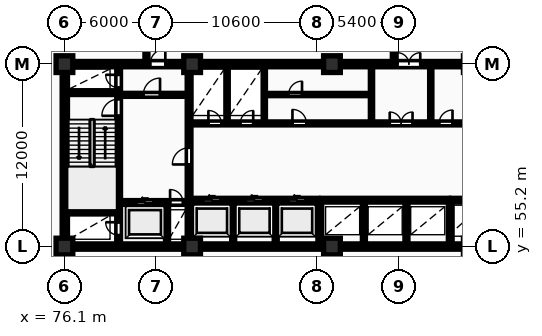
"""IFC4 building model, lengths in metres.
Left out: names, types, materials, properties, quantities, classifications, styles, units other than length and angle.
Written with IfcOpenShell. Run it as: python <this file> out.ifc"""

import sys

from ifc_helpers import new_model, si_unit, direction, frame, frame_2d, origin, origin_2d, place, context, subcontext, project, spatial, rectangle, extrude, element, fill, save


model = new_model("IFC4")
c1 = context("Model", 3, precision=1e-05, world=origin(), true_north=direction((0.0, 1.0)))
c2 = subcontext(c1, "Body", "Model", "MODEL_VIEW")
j1 = project(units=[si_unit("LENGTHUNIT", "METRE"), si_unit("PLANEANGLEUNIT", "RADIAN")], contexts=[c1])
p1 = place(None, origin())
s1 = spatial("IfcSite", under=j1, at=p1, CompositionType="ELEMENT")
p2 = place(p1, origin())
s2 = spatial("IfcBuilding", under=s1, at=p2, CompositionType="ELEMENT")
p3 = place(p2, frame((0.0, 0.0, 10.0)))
s3 = spatial("IfcBuildingStorey", under=s2, at=p3, CompositionType="ELEMENT", Elevation=10.0)
for number, where, z_axis, x_axis in (
    (1, (76.1, 55.2, 0.0), (0.0, 0.0, 1.0), (1.0, 0.0, 0.0)),
    (2, (76.1, 67.2, 0.0), (0.0, 0.0, 1.0), (1.0, 0.0, 0.0)),
    (3, (84.5, 55.2, 0.0), (0.0, 0.0, 1.0), (1.0, 0.0, 0.0)),
    (4, (84.5, 67.2, 0.0), (0.0, 0.0, 1.0), (1.0, 0.0, 0.0)),
    (5, (93.7, 55.2, 0.0), (0.0, 0.0, 1.0), (1.0, 0.0, 0.0)),
    (6, (93.7, 67.2, 0.0), (0.0, 0.0, 1.0), (1.0, 0.0, 0.0)),
):
    element("IfcColumn", number, at=place(p3, frame(where, z_axis=z_axis, x_axis=x_axis)), inside=s3, PredefinedType="COLUMN", context=c2, shape_type="SweptSolid", body=[
        extrude(rectangle(XDim=1.1, YDim=1.1, at=origin_2d()), origin(), (0.0, 0.0, 1.0), 4.5),
    ])
p4 = place(p3, frame((75.95, 55.2, 0.0), z_axis=(0.0, 0.0, 1.0), x_axis=(1.0, 0.0, 0.0)))
e7 = element("IfcWall", 7, at=p4, inside=s3, PredefinedType="SHEAR", context=c2, shape_type="SweptSolid", body=[
    extrude(rectangle(XDim=36.3, YDim=0.35, at=frame_2d((18.15, 0.0))), origin(), (0.0, 0.0, 1.0), 4.5),
])
p5 = place(p3, frame((76.125, 55.375, 0.0), z_axis=(0.0, 0.0, 1.0), x_axis=(0.0, 1.0, 0.0)))
e8 = element("IfcWall", 8, at=p5, inside=s3, PredefinedType="SHEAR", context=c2, shape_type="SweptSolid", body=[
    extrude(rectangle(XDim=11.65, YDim=0.35, at=frame_2d((5.825, 0.0))), origin(), (0.0, 0.0, 1.0), 4.5),
])
p6 = place(p3, frame((75.95, 67.2, 0.0), z_axis=(0.0, 0.0, 1.0), x_axis=(1.0, 0.0, 0.0)))
e9 = element("IfcWall", 9, at=p6, inside=s3, PredefinedType="SHEAR", context=c2, shape_type="SweptSolid", body=[
    extrude(rectangle(XDim=36.3, YDim=0.35, at=frame_2d((18.15, 0.0))), origin(), (0.0, 0.0, 1.0), 4.5),
])
p7 = place(p6, frame((5.788, 0.0, 0.0)))
e10 = element("IfcOpeningElement", 10, at=p7, cuts=e9, PredefinedType="OPENING", context=c2, shape_type="SweptSolid", body=[
    extrude(rectangle(XDim=1.0, YDim=2.15, at=frame_2d((0.5, 1.075))), frame((0.0, 0.185, 0.0), z_axis=(0.0, -1.0, 0.0), x_axis=(1.0, 0.0, 0.0)), (0.0, 0.0, 1.0), 0.37),
])
p8 = place(p6, frame((22.058, 0.0, 0.0)))
e11 = element("IfcOpeningElement", 11, at=p8, cuts=e9, PredefinedType="OPENING", context=c2, shape_type="SweptSolid", body=[
    extrude(rectangle(XDim=1.5, YDim=2.2, at=frame_2d((0.75, 1.1))), frame((0.0, 0.185, 0.0), z_axis=(0.0, -1.0, 0.0), x_axis=(1.0, 0.0, 0.0)), (0.0, 0.0, 1.0), 0.37),
])
p9 = place(p6, frame((30.45, 0.0, 0.0)))
e12 = element("IfcOpeningElement", 12, at=p9, cuts=e9, PredefinedType="OPENING", context=c2, shape_type="SweptSolid", body=[
    extrude(rectangle(XDim=1.0, YDim=2.15, at=frame_2d((0.5, 1.075))), frame((0.0, 0.185, 0.0), z_axis=(0.0, -1.0, 0.0), x_axis=(1.0, 0.0, 0.0)), (0.0, 0.0, 1.0), 0.37),
])
p10 = place(p3, frame((79.665, 55.4, 0.0), z_axis=(0.0, 0.0, 1.0), x_axis=(0.0, 1.0, 0.0)))
e13 = element("IfcWall", 13, at=p10, inside=s3, PredefinedType="SHEAR", context=c2, shape_type="SweptSolid", body=[
    extrude(rectangle(XDim=11.6, YDim=0.25, at=frame_2d((5.8, 0.0))), origin(), (0.0, 0.0, 1.0), 4.5),
])
p11 = place(p10, frame((0.55, 0.0, 0.0)))
e14 = element("IfcOpeningElement", 14, at=p11, cuts=e13, PredefinedType="OPENING", context=c2, shape_type="SweptSolid", body=[
    extrude(rectangle(XDim=0.85, YDim=2.05, at=frame_2d((0.425, 1.025))), frame((0.0, 0.135, 0.0), z_axis=(0.0, -1.0, 0.0), x_axis=(1.0, 0.0, 0.0)), (0.0, 0.0, 1.0), 0.27),
])
p12 = place(p10, frame((8.4, 0.0, 0.0)))
e15 = element("IfcOpeningElement", 15, at=p12, cuts=e13, PredefinedType="OPENING", context=c2, shape_type="SweptSolid", body=[
    extrude(rectangle(XDim=1.1, YDim=2.1, at=frame_2d((0.55, 1.05))), frame((0.0, 0.135, 0.0), z_axis=(0.0, -1.0, 0.0), x_axis=(1.0, 0.0, 0.0)), (0.0, 0.0, 1.0), 0.27),
])
p13 = place(p10, frame((10.25, 0.0, 0.0)))
e16 = element("IfcOpeningElement", 16, at=p13, cuts=e13, PredefinedType="OPENING", context=c2, shape_type="SweptSolid", body=[
    extrude(rectangle(XDim=0.85, YDim=2.05, at=frame_2d((0.425, 1.025))), frame((0.0, 0.135, 0.0), z_axis=(0.0, -1.0, 0.0), x_axis=(1.0, 0.0, 0.0)), (0.0, 0.0, 1.0), 0.27),
])
for number, where, z_axis, x_axis in (
    (17, (76.3, 57.475, 0.0), (0.0, 0.0, 1.0), (1.0, 0.0, 0.0)),
    (18, (76.3, 65.325, 0.0), (0.0, 0.0, 1.0), (1.0, 0.0, 0.0)),
):
    element("IfcWall", number, at=place(p3, frame(where, z_axis=z_axis, x_axis=x_axis)), inside=s3, PredefinedType="SHEAR", context=c2, shape_type="SweptSolid", body=[
        extrude(rectangle(XDim=3.24, YDim=0.25, at=frame_2d((1.62, 0.0))), origin(), (0.0, 0.0, 1.0), 4.5),
    ])
p14 = place(p3, frame((79.79, 58.1, 0.0), z_axis=(0.0, 0.0, 1.0), x_axis=(1.0, 0.0, 0.0)))
e19 = element("IfcWall", 19, at=p14, inside=s3, PredefinedType="SHEAR", context=c2, shape_type="SweptSolid", body=[
    extrude(rectangle(XDim=4.39, YDim=0.25, at=frame_2d((2.195, 0.0))), origin(), (0.0, 0.0, 1.0), 4.5),
])
p15 = place(p14, frame((1.05, 0.0, 0.0)))
e20 = element("IfcOpeningElement", 20, at=p15, cuts=e19, PredefinedType="OPENING", context=c2, shape_type="SweptSolid", body=[
    extrude(rectangle(XDim=1.12, YDim=2.12, at=frame_2d((0.56, 1.06))), frame((0.0, 0.135, 0.0), z_axis=(0.0, -1.0, 0.0), x_axis=(1.0, 0.0, 0.0)), (0.0, 0.0, 1.0), 0.27),
])
p16 = place(p14, frame((3.26, 0.0, 0.0)))
e21 = element("IfcOpeningElement", 21, at=p16, cuts=e19, PredefinedType="OPENING", context=c2, shape_type="SweptSolid", body=[
    extrude(rectangle(XDim=0.85, YDim=2.05, at=frame_2d((0.425, 1.025))), frame((0.0, 0.135, 0.0), z_axis=(0.0, -1.0, 0.0), x_axis=(1.0, 0.0, 0.0)), (0.0, 0.0, 1.0), 0.27),
])
p17 = place(p3, frame((82.85, 55.4, 0.0), z_axis=(0.0, 0.0, 1.0), x_axis=(0.0, 1.0, 0.0)))
e22 = element("IfcWall", 22, at=p17, inside=s3, PredefinedType="PARTITIONING", context=c2, shape_type="SweptSolid", body=[
    extrude(rectangle(XDim=2.56, YDim=0.2, at=frame_2d((1.28, 0.0))), origin(), (0.0, 0.0, 1.0), 4.2),
])
p18 = place(p3, frame((79.79, 65.18, 0.0), z_axis=(0.0, 0.0, 1.0), x_axis=(1.0, 0.0, 0.0)))
e23 = element("IfcWall", 23, at=p18, inside=s3, PredefinedType="PARTITIONING", context=c2, shape_type="SweptSolid", body=[
    extrude(rectangle(XDim=4.39, YDim=0.2, at=frame_2d((2.195, 0.0))), origin(), (0.0, 0.0, 1.0), 4.2),
])
p19 = place(p18, frame((1.5, 0.0, 0.0)))
e24 = element("IfcOpeningElement", 24, at=p19, cuts=e23, PredefinedType="OPENING", context=c2, shape_type="SweptSolid", body=[
    extrude(rectangle(XDim=1.1, YDim=2.1, at=frame_2d((0.55, 1.05))), frame((0.0, 0.11, 0.0), z_axis=(0.0, -1.0, 0.0), x_axis=(1.0, 0.0, 0.0)), (0.0, 0.0, 1.0), 0.22),
])
p20 = place(p3, frame((84.3, 55.4, 0.0), z_axis=(0.0, 0.0, 1.0), x_axis=(0.0, 1.0, 0.0)))
e25 = element("IfcWall", 25, at=p20, inside=s3, PredefinedType="SHEAR", context=c2, shape_type="SweptSolid", body=[
    extrude(rectangle(XDim=11.6, YDim=0.25, at=frame_2d((5.8, 0.0))), origin(), (0.0, 0.0, 1.0), 4.5),
])
p21 = place(p20, frame((5.2, 0.0, 0.0)))
e26 = element("IfcOpeningElement", 26, at=p21, cuts=e25, PredefinedType="OPENING", context=c2, shape_type="SweptSolid", body=[
    extrude(rectangle(XDim=1.1, YDim=2.1, at=frame_2d((0.55, 1.05))), frame((0.0, 0.135, 0.0), z_axis=(0.0, -1.0, 0.0), x_axis=(1.0, 0.0, 0.0)), (0.0, 0.0, 1.0), 0.27),
])
for number, where, z_axis, x_axis in (
    (27, (87.2, 55.4, 0.0), (0.0, 0.0, 1.0), (0.0, 1.0, 0.0)),
    (28, (90.0, 55.4, 0.0), (0.0, 0.0, 1.0), (0.0, 1.0, 0.0)),
):
    element("IfcWall", number, at=place(p3, frame(where, z_axis=z_axis, x_axis=x_axis)), inside=s3, PredefinedType="PARTITIONING", context=c2, shape_type="SweptSolid", body=[
        extrude(rectangle(XDim=2.72, YDim=0.2, at=frame_2d((1.36, 0.0))), origin(), (0.0, 0.0, 1.0), 4.2),
    ])
p22 = place(p3, frame((84.42, 58.25, 0.0), z_axis=(0.0, 0.0, 1.0), x_axis=(1.0, 0.0, 0.0)))
e29 = element("IfcWall", 29, at=p22, inside=s3, PredefinedType="SHEAR", context=c2, shape_type="SweptSolid", body=[
    extrude(rectangle(XDim=8.36, YDim=0.25, at=frame_2d((4.18, 0.0))), origin(), (0.0, 0.0, 1.0), 4.5),
])
p23 = place(p22, frame((0.82, 0.0, 0.0)))
e30 = element("IfcOpeningElement", 30, at=p23, cuts=e29, PredefinedType="OPENING", context=c2, shape_type="SweptSolid", body=[
    extrude(rectangle(XDim=1.12, YDim=2.12, at=frame_2d((0.56, 1.06))), frame((0.0, 0.135, 0.0), z_axis=(0.0, -1.0, 0.0), x_axis=(1.0, 0.0, 0.0)), (0.0, 0.0, 1.0), 0.27),
])
p24 = place(p22, frame((3.62, 0.0, 0.0)))
e31 = element("IfcOpeningElement", 31, at=p24, cuts=e29, PredefinedType="OPENING", context=c2, shape_type="SweptSolid", body=[
    extrude(rectangle(XDim=1.12, YDim=2.12, at=frame_2d((0.56, 1.06))), frame((0.0, 0.135, 0.0), z_axis=(0.0, -1.0, 0.0), x_axis=(1.0, 0.0, 0.0)), (0.0, 0.0, 1.0), 0.27),
])
p25 = place(p22, frame((6.42, 0.0, 0.0)))
e32 = element("IfcOpeningElement", 32, at=p25, cuts=e29, PredefinedType="OPENING", context=c2, shape_type="SweptSolid", body=[
    extrude(rectangle(XDim=1.12, YDim=2.12, at=frame_2d((0.56, 1.06))), frame((0.0, 0.135, 0.0), z_axis=(0.0, -1.0, 0.0), x_axis=(1.0, 0.0, 0.0)), (0.0, 0.0, 1.0), 0.27),
])
p26 = place(p3, frame((92.9, 55.4, 0.0), z_axis=(0.0, 0.0, 1.0), x_axis=(0.0, 1.0, 0.0)))
e33 = element("IfcWall", 33, at=p26, inside=s3, PredefinedType="SHEAR", context=c2, shape_type="SweptSolid", body=[
    extrude(rectangle(XDim=2.85, YDim=0.25, at=frame_2d((1.425, 0.0))), origin(), (0.0, 0.0, 1.0), 4.5),
])
for number, where, z_axis, x_axis in (
    (34, (95.8, 55.4, 0.0), (0.0, 0.0, 1.0), (0.0, 1.0, 0.0)),
    (35, (98.6, 55.4, 0.0), (0.0, 0.0, 1.0), (0.0, 1.0, 0.0)),
):
    element("IfcWall", number, at=place(p3, frame(where, z_axis=z_axis, x_axis=x_axis)), inside=s3, PredefinedType="PARTITIONING", context=c2, shape_type="SweptSolid", body=[
        extrude(rectangle(XDim=2.72, YDim=0.2, at=frame_2d((1.36, 0.0))), origin(), (0.0, 0.0, 1.0), 4.2),
    ])
p27 = place(p3, frame((93.02, 58.25, 0.0), z_axis=(0.0, 0.0, 1.0), x_axis=(1.0, 0.0, 0.0)))
e36 = element("IfcWall", 36, at=p27, inside=s3, PredefinedType="SHEAR", context=c2, shape_type="SweptSolid", body=[
    extrude(rectangle(XDim=8.36, YDim=0.25, at=frame_2d((4.18, 0.0))), origin(), (0.0, 0.0, 1.0), 4.5),
])
p28 = place(p3, frame((101.48, 55.4, 0.0), z_axis=(0.0, 0.0, 1.0), x_axis=(0.0, 1.0, 0.0)))
e37 = element("IfcWall", 37, at=p28, inside=s3, PredefinedType="SHEAR", context=c2, shape_type="SweptSolid", body=[
    extrude(rectangle(XDim=2.85, YDim=0.25, at=frame_2d((1.425, 0.0))), origin(), (0.0, 0.0, 1.0), 4.5),
])
p29 = place(p3, frame((101.55, 58.25, 0.0), z_axis=(0.0, 0.0, 1.0), x_axis=(1.0, 0.0, 0.0)))
e38 = element("IfcWall", 38, at=p29, inside=s3, PredefinedType="SHEAR", context=c2, shape_type="SweptSolid", body=[
    extrude(rectangle(XDim=4.6, YDim=0.25, at=frame_2d((2.3, 0.0))), origin(), (0.0, 0.0, 1.0), 4.5),
])
for number, where, z_axis, x_axis in (
    (39, (86.8, 63.4, 0.0), (0.0, 0.0, 1.0), (0.0, 1.0, 0.0)),
    (40, (89.25, 63.4, 0.0), (0.0, 0.0, 1.0), (0.0, 1.0, 0.0)),
):
    element("IfcWall", number, at=place(p3, frame(where, z_axis=z_axis, x_axis=x_axis)), inside=s3, PredefinedType="PARTITIONING", context=c2, shape_type="SweptSolid", body=[
        extrude(rectangle(XDim=3.6, YDim=0.15, at=frame_2d((1.8, 0.0))), origin(), (0.0, 0.0, 1.0), 4.2),
    ])
p30 = place(p3, frame((89.25, 65.2, 0.0), z_axis=(0.0, 0.0, 1.0), x_axis=(1.0, 0.0, 0.0)))
e41 = element("IfcWall", 41, at=p30, inside=s3, PredefinedType="PARTITIONING", context=c2, shape_type="SweptSolid", body=[
    extrude(rectangle(XDim=7.05, YDim=0.15, at=frame_2d((3.525, 0.0))), origin(), (0.0, 0.0, 1.0), 4.2),
])
p31 = place(p30, frame((1.6, 0.0, 0.0)))
e42 = element("IfcOpeningElement", 42, at=p31, cuts=e41, PredefinedType="OPENING", context=c2, shape_type="SweptSolid", body=[
    extrude(rectangle(XDim=0.88, YDim=2.06, at=frame_2d((0.44, 1.03))), frame((0.0, 0.085, 0.0), z_axis=(0.0, -1.0, 0.0), x_axis=(1.0, 0.0, 0.0)), (0.0, 0.0, 1.0), 0.17),
])
for number, where, z_axis, x_axis in (
    (43, (96.3, 63.4, 0.0), (0.0, 0.0, 1.0), (0.0, 1.0, 0.0)),
    (44, (100.2, 63.4, 0.0), (0.0, 0.0, 1.0), (0.0, 1.0, 0.0)),
):
    element("IfcWall", number, at=place(p3, frame(where, z_axis=z_axis, x_axis=x_axis)), inside=s3, PredefinedType="PARTITIONING", context=c2, shape_type="SweptSolid", body=[
        extrude(rectangle(XDim=3.6, YDim=0.15, at=frame_2d((1.8, 0.0))), origin(), (0.0, 0.0, 1.0), 4.2),
    ])
p32 = place(p3, frame((84.42, 63.3, 0.0), z_axis=(0.0, 0.0, 1.0), x_axis=(1.0, 0.0, 0.0)))
e45 = element("IfcWall", 45, at=p32, inside=s3, PredefinedType="PARTITIONING", context=c2, shape_type="SweptSolid", body=[
    extrude(rectangle(XDim=19.83, YDim=0.2, at=frame_2d((9.915, 0.0))), origin(), (0.0, 0.0, 1.0), 4.2),
])
p33 = place(p32, frame((1.15, 0.0, 0.0)))
e46 = element("IfcOpeningElement", 46, at=p33, cuts=e45, PredefinedType="OPENING", context=c2, shape_type="SweptSolid", body=[
    extrude(rectangle(XDim=0.85, YDim=2.05, at=frame_2d((0.425, 1.025))), frame((0.0, 0.11, 0.0), z_axis=(0.0, -1.0, 0.0), x_axis=(1.0, 0.0, 0.0)), (0.0, 0.0, 1.0), 0.22),
])
p34 = place(p32, frame((3.25, 0.0, 0.0)))
e47 = element("IfcOpeningElement", 47, at=p34, cuts=e45, PredefinedType="OPENING", context=c2, shape_type="SweptSolid", body=[
    extrude(rectangle(XDim=0.85, YDim=2.05, at=frame_2d((0.425, 1.025))), frame((0.0, 0.11, 0.0), z_axis=(0.0, -1.0, 0.0), x_axis=(1.0, 0.0, 0.0)), (0.0, 0.0, 1.0), 0.22),
])
p35 = place(p32, frame((13.08, 0.0, 0.0)))
e48 = element("IfcOpeningElement", 48, at=p35, cuts=e45, PredefinedType="OPENING", context=c2, shape_type="SweptSolid", body=[
    extrude(rectangle(XDim=1.5, YDim=2.2, at=frame_2d((0.75, 1.1))), frame((0.0, 0.11, 0.0), z_axis=(0.0, -1.0, 0.0), x_axis=(1.0, 0.0, 0.0)), (0.0, 0.0, 1.0), 0.22),
])
p36 = place(p32, frame((6.68, 0.0, 0.0)))
e49 = element("IfcOpeningElement", 49, at=p36, cuts=e45, PredefinedType="OPENING", context=c2, shape_type="SweptSolid", body=[
    extrude(rectangle(XDim=0.92, YDim=2.08, at=frame_2d((0.46, 1.04))), frame((0.0, 0.11, 0.0), z_axis=(0.0, -1.0, 0.0), x_axis=(1.0, 0.0, 0.0)), (0.0, 0.0, 1.0), 0.22),
])
p37 = place(p32, frame((16.33, 0.0, 0.0)))
e50 = element("IfcOpeningElement", 50, at=p37, cuts=e45, PredefinedType="OPENING", context=c2, shape_type="SweptSolid", body=[
    extrude(rectangle(XDim=0.88, YDim=2.06, at=frame_2d((0.44, 1.03))), frame((0.0, 0.11, 0.0), z_axis=(0.0, -1.0, 0.0), x_axis=(1.0, 0.0, 0.0)), (0.0, 0.0, 1.0), 0.22),
])
p38 = place(p3, frame((81.495, 67.4, 0.0), z_axis=(0.0, 0.0, 1.0), x_axis=(0.0, 1.0, 0.0)))
e51 = element("IfcWall", 51, at=p38, inside=s3, PredefinedType="PARTITIONING", context=c2, shape_type="SweptSolid", body=[
    extrude(rectangle(XDim=36.62, YDim=0.2, at=frame_2d((18.31, 0.0))), origin(), (0.0, 0.0, 1.0), 4.2),
])
p39 = place(p38, frame((9.5, 0.0, 0.0)))
e52 = element("IfcOpeningElement", 52, at=p39, cuts=e51, PredefinedType="OPENING", context=c2, shape_type="SweptSolid", body=[
    extrude(rectangle(XDim=1.22, YDim=2.18, at=frame_2d((0.61, 1.09))), frame((0.0, 0.11, 0.0), z_axis=(0.0, -1.0, 0.0), x_axis=(1.0, 0.0, 0.0)), (0.0, 0.0, 1.0), 0.22),
])
p40 = place(p3, frame((97.77, 67.4, 0.0), z_axis=(0.0, 0.0, 1.0), x_axis=(0.0, 1.0, 0.0)))
e53 = element("IfcWall", 53, at=p40, inside=s3, PredefinedType="PARTITIONING", context=c2, shape_type="SweptSolid", body=[
    extrude(rectangle(XDim=36.62, YDim=0.2, at=frame_2d((18.31, 0.0))), origin(), (0.0, 0.0, 1.0), 4.2),
])
p41 = place(p40, frame((9.5, 0.0, 0.0)))
e54 = element("IfcOpeningElement", 54, at=p41, cuts=e53, PredefinedType="OPENING", context=c2, shape_type="SweptSolid", body=[
    extrude(rectangle(XDim=1.22, YDim=2.18, at=frame_2d((0.61, 1.09))), frame((0.0, 0.11, 0.0), z_axis=(0.0, -1.0, 0.0), x_axis=(1.0, 0.0, 0.0)), (0.0, 0.0, 1.0), 0.22),
])
p42 = place(p7, origin())
e55 = element("IfcDoor", 55, at=p42, inside=s3, OperationType="SINGLE_SWING_RIGHT", PredefinedType="DOOR", context=c2, shape_type="SweptSolid", body=[
    extrude(rectangle(XDim=1.0, YDim=2.15, at=frame_2d((0.5, 1.075))), frame((0.0, 0.025, 0.0), z_axis=(0.0, -1.0, 0.0), x_axis=(1.0, 0.0, 0.0)), (0.0, 0.0, 1.0), 0.05),
])
fill(e10, e55)
p43 = place(p8, origin())
e56 = element("IfcDoor", 56, at=p43, inside=s3, OperationType="DOUBLE_DOOR_SINGLE_SWING", PredefinedType="DOOR", context=c2, shape_type="SweptSolid", body=[
    extrude(rectangle(XDim=1.5, YDim=2.2, at=frame_2d((0.75, 1.1))), frame((0.0, 0.025, 0.0), z_axis=(0.0, -1.0, 0.0), x_axis=(1.0, 0.0, 0.0)), (0.0, 0.0, 1.0), 0.05),
])
fill(e11, e56)
p44 = place(p11, origin())
e57 = element("IfcDoor", 57, at=p44, inside=s3, OperationType="SINGLE_SWING_RIGHT", PredefinedType="DOOR", context=c2, shape_type="SweptSolid", body=[
    extrude(rectangle(XDim=0.85, YDim=2.05, at=frame_2d((0.425, 1.025))), frame((0.0, 0.025, 0.0), z_axis=(0.0, -1.0, 0.0), x_axis=(1.0, 0.0, 0.0)), (0.0, 0.0, 1.0), 0.05),
])
fill(e14, e57)
p45 = place(p12, origin())
e58 = element("IfcDoor", 58, at=p45, inside=s3, OperationType="SINGLE_SWING_LEFT", PredefinedType="DOOR", context=c2, shape_type="SweptSolid", body=[
    extrude(rectangle(XDim=1.1, YDim=2.1, at=frame_2d((0.55, 1.05))), frame((0.0, 0.025, 0.0), z_axis=(0.0, -1.0, 0.0), x_axis=(1.0, 0.0, 0.0)), (0.0, 0.0, 1.0), 0.05),
])
fill(e15, e58)
p46 = place(p13, origin())
e59 = element("IfcDoor", 59, at=p46, inside=s3, OperationType="SINGLE_SWING_RIGHT", PredefinedType="DOOR", context=c2, shape_type="SweptSolid", body=[
    extrude(rectangle(XDim=0.85, YDim=2.05, at=frame_2d((0.425, 1.025))), frame((0.0, 0.025, 0.0), z_axis=(0.0, -1.0, 0.0), x_axis=(1.0, 0.0, 0.0)), (0.0, 0.0, 1.0), 0.05),
])
fill(e16, e59)
p47 = place(p15, origin())
e60 = element("IfcDoor", 60, at=p47, inside=s3, OperationType="SLIDING_TO_LEFT", PredefinedType="DOOR", context=c2, shape_type="SweptSolid", body=[
    extrude(rectangle(XDim=1.12, YDim=2.12, at=frame_2d((0.56, 1.06))), frame((0.0, 0.025, 0.0), z_axis=(0.0, -1.0, 0.0), x_axis=(1.0, 0.0, 0.0)), (0.0, 0.0, 1.0), 0.05),
])
fill(e20, e60)
p48 = place(p16, origin())
e61 = element("IfcDoor", 61, at=p48, inside=s3, OperationType="SINGLE_SWING_LEFT", PredefinedType="DOOR", context=c2, shape_type="SweptSolid", body=[
    extrude(rectangle(XDim=0.85, YDim=2.05, at=frame_2d((0.425, 1.025))), frame((0.0, 0.025, 0.0), z_axis=(0.0, -1.0, 0.0), x_axis=(1.0, 0.0, 0.0)), (0.0, 0.0, 1.0), 0.05),
])
fill(e21, e61)
p49 = place(p19, origin())
e62 = element("IfcDoor", 62, at=p49, inside=s3, OperationType="SINGLE_SWING_RIGHT", PredefinedType="DOOR", context=c2, shape_type="SweptSolid", body=[
    extrude(rectangle(XDim=1.1, YDim=2.1, at=frame_2d((0.55, 1.05))), frame((0.0, 0.025, 0.0), z_axis=(0.0, -1.0, 0.0), x_axis=(1.0, 0.0, 0.0)), (0.0, 0.0, 1.0), 0.05),
])
fill(e24, e62)
p50 = place(p21, origin())
e63 = element("IfcDoor", 63, at=p50, inside=s3, OperationType="SINGLE_SWING_LEFT", PredefinedType="DOOR", context=c2, shape_type="SweptSolid", body=[
    extrude(rectangle(XDim=1.1, YDim=2.1, at=frame_2d((0.55, 1.05))), frame((0.0, 0.025, 0.0), z_axis=(0.0, -1.0, 0.0), x_axis=(1.0, 0.0, 0.0)), (0.0, 0.0, 1.0), 0.05),
])
fill(e26, e63)
p51 = place(p23, origin())
e64 = element("IfcDoor", 64, at=p51, inside=s3, OperationType="SLIDING_TO_LEFT", PredefinedType="DOOR", context=c2, shape_type="SweptSolid", body=[
    extrude(rectangle(XDim=1.12, YDim=2.12, at=frame_2d((0.56, 1.06))), frame((0.0, 0.025, 0.0), z_axis=(0.0, -1.0, 0.0), x_axis=(1.0, 0.0, 0.0)), (0.0, 0.0, 1.0), 0.05),
])
fill(e30, e64)
p52 = place(p24, origin())
e65 = element("IfcDoor", 65, at=p52, inside=s3, OperationType="SLIDING_TO_LEFT", PredefinedType="DOOR", context=c2, shape_type="SweptSolid", body=[
    extrude(rectangle(XDim=1.12, YDim=2.12, at=frame_2d((0.56, 1.06))), frame((0.0, 0.025, 0.0), z_axis=(0.0, -1.0, 0.0), x_axis=(1.0, 0.0, 0.0)), (0.0, 0.0, 1.0), 0.05),
])
fill(e31, e65)
p53 = place(p25, origin())
e66 = element("IfcDoor", 66, at=p53, inside=s3, OperationType="SLIDING_TO_LEFT", PredefinedType="DOOR", context=c2, shape_type="SweptSolid", body=[
    extrude(rectangle(XDim=1.12, YDim=2.12, at=frame_2d((0.56, 1.06))), frame((0.0, 0.025, 0.0), z_axis=(0.0, -1.0, 0.0), x_axis=(1.0, 0.0, 0.0)), (0.0, 0.0, 1.0), 0.05),
])
fill(e32, e66)
p54 = place(p31, origin())
e67 = element("IfcDoor", 67, at=p54, inside=s3, OperationType="SINGLE_SWING_RIGHT", PredefinedType="DOOR", context=c2, shape_type="SweptSolid", body=[
    extrude(rectangle(XDim=0.88, YDim=2.06, at=frame_2d((0.44, 1.03))), frame((0.0, 0.025, 0.0), z_axis=(0.0, -1.0, 0.0), x_axis=(1.0, 0.0, 0.0)), (0.0, 0.0, 1.0), 0.05),
])
fill(e42, e67)
p55 = place(p33, origin())
e68 = element("IfcDoor", 68, at=p55, inside=s3, OperationType="SINGLE_SWING_LEFT", PredefinedType="DOOR", context=c2, shape_type="SweptSolid", body=[
    extrude(rectangle(XDim=0.85, YDim=2.05, at=frame_2d((0.425, 1.025))), frame((0.0, 0.025, 0.0), z_axis=(0.0, -1.0, 0.0), x_axis=(1.0, 0.0, 0.0)), (0.0, 0.0, 1.0), 0.05),
])
fill(e46, e68)
p56 = place(p34, origin())
e69 = element("IfcDoor", 69, at=p56, inside=s3, OperationType="SINGLE_SWING_RIGHT", PredefinedType="DOOR", context=c2, shape_type="SweptSolid", body=[
    extrude(rectangle(XDim=0.85, YDim=2.05, at=frame_2d((0.425, 1.025))), frame((0.0, 0.025, 0.0), z_axis=(0.0, -1.0, 0.0), x_axis=(1.0, 0.0, 0.0)), (0.0, 0.0, 1.0), 0.05),
])
fill(e47, e69)
p57 = place(p35, origin())
e70 = element("IfcDoor", 70, at=p57, inside=s3, OperationType="DOUBLE_DOOR_SINGLE_SWING", PredefinedType="DOOR", context=c2, shape_type="SweptSolid", body=[
    extrude(rectangle(XDim=1.5, YDim=2.2, at=frame_2d((0.75, 1.1))), frame((0.0, 0.025, 0.0), z_axis=(0.0, -1.0, 0.0), x_axis=(1.0, 0.0, 0.0)), (0.0, 0.0, 1.0), 0.05),
])
fill(e48, e70)
p58 = place(p36, origin())
e71 = element("IfcDoor", 71, at=p58, inside=s3, OperationType="SINGLE_SWING_LEFT", PredefinedType="DOOR", context=c2, shape_type="SweptSolid", body=[
    extrude(rectangle(XDim=0.92, YDim=2.08, at=frame_2d((0.46, 1.04))), frame((0.0, 0.025, 0.0), z_axis=(0.0, -1.0, 0.0), x_axis=(1.0, 0.0, 0.0)), (0.0, 0.0, 1.0), 0.05),
])
fill(e49, e71)
p59 = place(p37, origin())
e72 = element("IfcDoor", 72, at=p59, inside=s3, OperationType="SINGLE_SWING_RIGHT", PredefinedType="DOOR", context=c2, shape_type="SweptSolid", body=[
    extrude(rectangle(XDim=0.88, YDim=2.06, at=frame_2d((0.44, 1.03))), frame((0.0, 0.025, 0.0), z_axis=(0.0, -1.0, 0.0), x_axis=(1.0, 0.0, 0.0)), (0.0, 0.0, 1.0), 0.05),
])
fill(e50, e72)
save(model, sys.argv[1])
